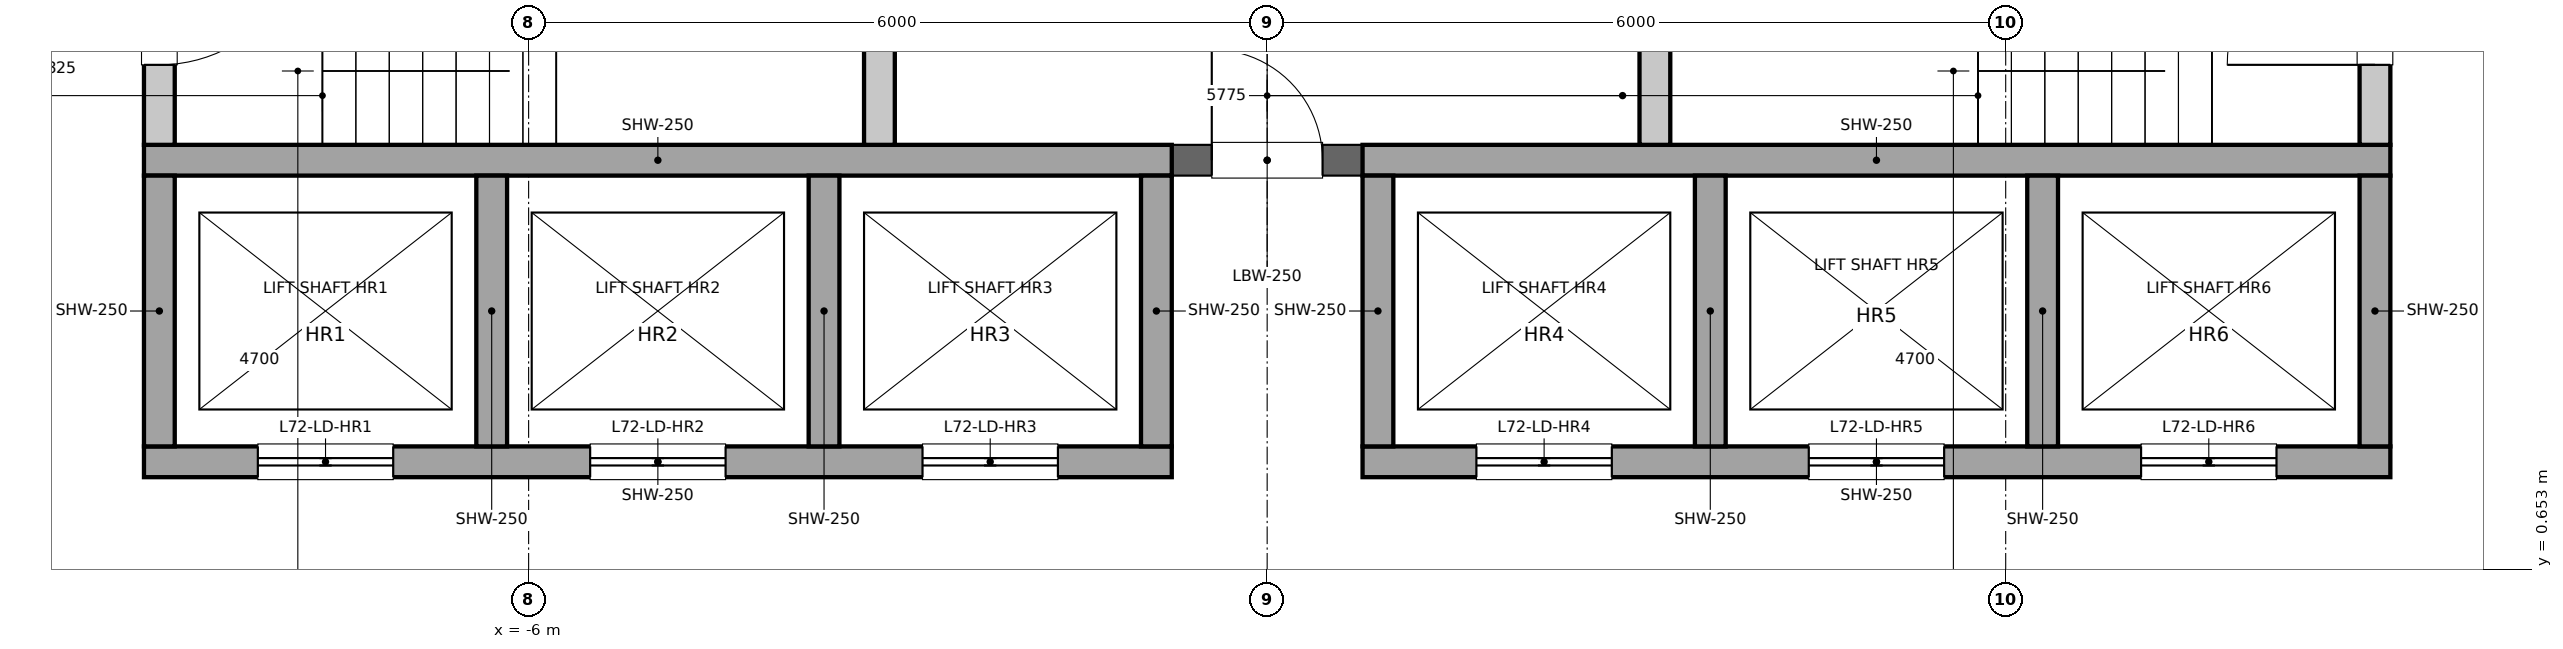
"""IFC4 building model, lengths in metres.
Left out: names, types, materials, properties, quantities, classifications, styles, units other than length and angle.
Written with IfcOpenShell. Run it as: python <this file> out.ifc"""

import sys

from ifc_helpers import new_model, si_unit, direction, frame, frame_2d, origin, place, context, subcontext, project, spatial, rectangle, extrude, element, fill, save


model = new_model("IFC4")
c1 = context("Model", 3, precision=1e-05, world=origin(), true_north=direction((0.0, 1.0)))
c2 = subcontext(c1, "Body", "Model", "MODEL_VIEW")
j1 = project(units=[si_unit("LENGTHUNIT", "METRE"), si_unit("PLANEANGLEUNIT", "RADIAN")], contexts=[c1])
p1 = place(None, origin())
s1 = spatial("IfcSite", under=j1, at=p1, CompositionType="ELEMENT")
p2 = place(p1, origin())
s2 = spatial("IfcBuilding", under=s1, at=p2, CompositionType="ELEMENT")
p3 = place(p2, frame((0.0, 0.0, 324.4)))
s3 = spatial("IfcBuildingStorey", under=s2, at=p3, CompositionType="ELEMENT", Elevation=324.4)
p4 = place(p3, frame((-9.0, 4.1, 0.0), z_axis=(0.0, 0.0, 1.0), x_axis=(0.0, 1.0, 0.0)))
e1 = element("IfcWall", 1, at=p4, inside=s3, PredefinedType="SOLIDWALL", context=c2, shape_type="SweptSolid", body=[
    extrude(rectangle(XDim=2.5, YDim=0.25, at=frame_2d((1.25, 0.0))), origin(), (0.0, 0.0, 1.0), 5.2),
])
p5 = place(p4, frame((0.65, 0.0, 0.0)))
e2 = element("IfcOpeningElement", 2, at=p5, cuts=e1, PredefinedType="OPENING", context=c2, shape_type="SweptSolid", body=[
    extrude(rectangle(XDim=1.2, YDim=2.1, at=frame_2d((0.6, 1.05))), frame((0.0, 0.125, 0.0), z_axis=(0.0, -1.0, 0.0), x_axis=(1.0, 0.0, 0.0)), (0.0, 0.0, 1.0), 0.25),
])
p6 = place(p3, frame((9.0, 4.1, 0.0), z_axis=(0.0, 0.0, 1.0), x_axis=(0.0, 1.0, 0.0)))
e3 = element("IfcWall", 3, at=p6, inside=s3, PredefinedType="SOLIDWALL", context=c2, shape_type="SweptSolid", body=[
    extrude(rectangle(XDim=2.5, YDim=0.25, at=frame_2d((1.25, 0.0))), origin(), (0.0, 0.0, 1.0), 5.2),
])
p7 = place(p6, frame((0.65, 0.0, 0.0)))
e4 = element("IfcOpeningElement", 4, at=p7, cuts=e3, PredefinedType="OPENING", context=c2, shape_type="SweptSolid", body=[
    extrude(rectangle(XDim=1.2, YDim=2.1, at=frame_2d((0.6, 1.05))), frame((0.0, 0.125, 0.0), z_axis=(0.0, -1.0, 0.0), x_axis=(1.0, 0.0, 0.0)), (0.0, 0.0, 1.0), 0.25),
])
for number, where, z_axis, x_axis in (
    (5, (-3.15, 4.1, 0.0), (0.0, 0.0, 1.0), (0.0, 1.0, 0.0)),
    (6, (3.15, 4.1, 0.0), (0.0, 0.0, 1.0), (0.0, 1.0, 0.0)),
):
    element("IfcWall", number, at=place(p3, frame(where, z_axis=z_axis, x_axis=x_axis)), inside=s3, PredefinedType="SOLIDWALL", context=c2, shape_type="SweptSolid", body=[
        extrude(rectangle(XDim=2.5, YDim=0.25, at=frame_2d((1.25, 0.0))), origin(), (0.0, 0.0, 1.0), 5.2),
    ])
p8 = place(p3, frame((-0.775, 3.975, 0.0), z_axis=(0.0, 0.0, 1.0), x_axis=(1.0, 0.0, 0.0)))
e7 = element("IfcWall", 7, at=p8, inside=s3, PredefinedType="PARTITIONING", context=c2, shape_type="SweptSolid", body=[
    extrude(rectangle(XDim=1.55, YDim=0.25, at=frame_2d((0.775, 0.0))), origin(), (0.0, 0.0, 1.0), 5.2),
])
p9 = place(p8, frame((0.325, 0.0, 0.0)))
e8 = element("IfcOpeningElement", 8, at=p9, cuts=e7, PredefinedType="OPENING", context=c2, shape_type="SweptSolid", body=[
    extrude(rectangle(XDim=0.9, YDim=2.1, at=frame_2d((0.45, 1.05))), frame((0.0, 0.125, 0.0), z_axis=(0.0, -1.0, 0.0), x_axis=(1.0, 0.0, 0.0)), (0.0, 0.0, 1.0), 0.25),
])
p10 = place(p3, frame((-9.125, 1.525, 0.0), z_axis=(0.0, 0.0, 1.0), x_axis=(1.0, 0.0, 0.0)))
e9 = element("IfcWall", 9, at=p10, inside=s3, PredefinedType="SOLIDWALL", context=c2, shape_type="SweptSolid", body=[
    extrude(rectangle(XDim=8.35, YDim=0.25, at=frame_2d((4.175, 0.0))), origin(), (0.0, 0.0, 1.0), 5.2),
])
p11 = place(p10, frame((0.925, 0.0, 0.0)))
e10 = element("IfcOpeningElement", 10, at=p11, cuts=e9, PredefinedType="OPENING", context=c2, shape_type="SweptSolid", body=[
    extrude(rectangle(XDim=1.1, YDim=2.1, at=frame_2d((0.55, 1.05))), frame((0.0, 0.125, 0.0), z_axis=(0.0, -1.0, 0.0), x_axis=(1.0, 0.0, 0.0)), (0.0, 0.0, 1.0), 0.25),
])
p12 = place(p10, frame((3.625, 0.0, 0.0)))
e11 = element("IfcOpeningElement", 11, at=p12, cuts=e9, PredefinedType="OPENING", context=c2, shape_type="SweptSolid", body=[
    extrude(rectangle(XDim=1.1, YDim=2.1, at=frame_2d((0.55, 1.05))), frame((0.0, 0.125, 0.0), z_axis=(0.0, -1.0, 0.0), x_axis=(1.0, 0.0, 0.0)), (0.0, 0.0, 1.0), 0.25),
])
p13 = place(p10, frame((6.325, 0.0, 0.0)))
e12 = element("IfcOpeningElement", 12, at=p13, cuts=e9, PredefinedType="OPENING", context=c2, shape_type="SweptSolid", body=[
    extrude(rectangle(XDim=1.1, YDim=2.1, at=frame_2d((0.55, 1.05))), frame((0.0, 0.125, 0.0), z_axis=(0.0, -1.0, 0.0), x_axis=(1.0, 0.0, 0.0)), (0.0, 0.0, 1.0), 0.25),
])
p14 = place(p3, frame((0.775, 1.525, 0.0), z_axis=(0.0, 0.0, 1.0), x_axis=(1.0, 0.0, 0.0)))
e13 = element("IfcWall", 13, at=p14, inside=s3, PredefinedType="SOLIDWALL", context=c2, shape_type="SweptSolid", body=[
    extrude(rectangle(XDim=8.35, YDim=0.25, at=frame_2d((4.175, 0.0))), origin(), (0.0, 0.0, 1.0), 5.2),
])
p15 = place(p14, frame((0.925, 0.0, 0.0)))
e14 = element("IfcOpeningElement", 14, at=p15, cuts=e13, PredefinedType="OPENING", context=c2, shape_type="SweptSolid", body=[
    extrude(rectangle(XDim=1.1, YDim=2.1, at=frame_2d((0.55, 1.05))), frame((0.0, 0.125, 0.0), z_axis=(0.0, -1.0, 0.0), x_axis=(1.0, 0.0, 0.0)), (0.0, 0.0, 1.0), 0.25),
])
p16 = place(p14, frame((3.625, 0.0, 0.0)))
e15 = element("IfcOpeningElement", 15, at=p16, cuts=e13, PredefinedType="OPENING", context=c2, shape_type="SweptSolid", body=[
    extrude(rectangle(XDim=1.1, YDim=2.1, at=frame_2d((0.55, 1.05))), frame((0.0, 0.125, 0.0), z_axis=(0.0, -1.0, 0.0), x_axis=(1.0, 0.0, 0.0)), (0.0, 0.0, 1.0), 0.25),
])
p17 = place(p14, frame((6.325, 0.0, 0.0)))
e16 = element("IfcOpeningElement", 16, at=p17, cuts=e13, PredefinedType="OPENING", context=c2, shape_type="SweptSolid", body=[
    extrude(rectangle(XDim=1.1, YDim=2.1, at=frame_2d((0.55, 1.05))), frame((0.0, 0.125, 0.0), z_axis=(0.0, -1.0, 0.0), x_axis=(1.0, 0.0, 0.0)), (0.0, 0.0, 1.0), 0.25),
])
for number, where, z_axis, x_axis in (
    (17, (-9.125, 3.975, 0.0), (0.0, 0.0, 1.0), (1.0, 0.0, 0.0)),
    (18, (0.775, 3.975, 0.0), (0.0, 0.0, 1.0), (1.0, 0.0, 0.0)),
):
    element("IfcWall", number, at=place(p3, frame(where, z_axis=z_axis, x_axis=x_axis)), inside=s3, PredefinedType="SOLIDWALL", context=c2, shape_type="SweptSolid", body=[
        extrude(rectangle(XDim=8.35, YDim=0.25, at=frame_2d((4.175, 0.0))), origin(), (0.0, 0.0, 1.0), 5.2),
    ])
for number, where, z_axis, x_axis in (
    (19, (-9.0, 1.65, 0.0), (0.0, 0.0, 1.0), (0.0, 1.0, 0.0)),
    (20, (9.0, 1.65, 0.0), (0.0, 0.0, 1.0), (0.0, 1.0, 0.0)),
    (21, (-6.3, 1.65, 0.0), (0.0, 0.0, 1.0), (0.0, 1.0, 0.0)),
    (22, (6.3, 1.65, 0.0), (0.0, 0.0, 1.0), (0.0, 1.0, 0.0)),
    (23, (-3.6, 1.65, 0.0), (0.0, 0.0, 1.0), (0.0, 1.0, 0.0)),
    (24, (3.6, 1.65, 0.0), (0.0, 0.0, 1.0), (0.0, 1.0, 0.0)),
    (25, (-0.9, 1.65, 0.0), (0.0, 0.0, 1.0), (0.0, 1.0, 0.0)),
    (26, (0.9, 1.65, 0.0), (0.0, 0.0, 1.0), (0.0, 1.0, 0.0)),
):
    element("IfcWall", number, at=place(p3, frame(where, z_axis=z_axis, x_axis=x_axis)), inside=s3, PredefinedType="SOLIDWALL", context=c2, shape_type="SweptSolid", body=[
        extrude(rectangle(XDim=2.2, YDim=0.25, at=frame_2d((1.1, 0.0))), origin(), (0.0, 0.0, 1.0), 5.2),
    ])
p18 = place(p11, origin())
e27 = element("IfcDoor", 27, at=p18, inside=s3, OperationType="DOUBLE_DOOR_SLIDING", PredefinedType="DOOR", context=c2, shape_type="SweptSolid", body=[
    extrude(rectangle(XDim=1.1, YDim=2.1, at=frame_2d((0.55, 1.05))), frame((0.0, 0.025, 0.0), z_axis=(0.0, -1.0, 0.0), x_axis=(1.0, 0.0, 0.0)), (0.0, 0.0, 1.0), 0.05),
])
fill(e10, e27)
p19 = place(p12, origin())
e28 = element("IfcDoor", 28, at=p19, inside=s3, OperationType="DOUBLE_DOOR_SLIDING", PredefinedType="DOOR", context=c2, shape_type="SweptSolid", body=[
    extrude(rectangle(XDim=1.1, YDim=2.1, at=frame_2d((0.55, 1.05))), frame((0.0, 0.025, 0.0), z_axis=(0.0, -1.0, 0.0), x_axis=(1.0, 0.0, 0.0)), (0.0, 0.0, 1.0), 0.05),
])
fill(e11, e28)
p20 = place(p13, origin())
e29 = element("IfcDoor", 29, at=p20, inside=s3, OperationType="DOUBLE_DOOR_SLIDING", PredefinedType="DOOR", context=c2, shape_type="SweptSolid", body=[
    extrude(rectangle(XDim=1.1, YDim=2.1, at=frame_2d((0.55, 1.05))), frame((0.0, 0.025, 0.0), z_axis=(0.0, -1.0, 0.0), x_axis=(1.0, 0.0, 0.0)), (0.0, 0.0, 1.0), 0.05),
])
fill(e12, e29)
p21 = place(p15, origin())
e30 = element("IfcDoor", 30, at=p21, inside=s3, OperationType="DOUBLE_DOOR_SLIDING", PredefinedType="DOOR", context=c2, shape_type="SweptSolid", body=[
    extrude(rectangle(XDim=1.1, YDim=2.1, at=frame_2d((0.55, 1.05))), frame((0.0, 0.025, 0.0), z_axis=(0.0, -1.0, 0.0), x_axis=(1.0, 0.0, 0.0)), (0.0, 0.0, 1.0), 0.05),
])
fill(e14, e30)
p22 = place(p16, origin())
e31 = element("IfcDoor", 31, at=p22, inside=s3, OperationType="DOUBLE_DOOR_SLIDING", PredefinedType="DOOR", context=c2, shape_type="SweptSolid", body=[
    extrude(rectangle(XDim=1.1, YDim=2.1, at=frame_2d((0.55, 1.05))), frame((0.0, 0.025, 0.0), z_axis=(0.0, -1.0, 0.0), x_axis=(1.0, 0.0, 0.0)), (0.0, 0.0, 1.0), 0.05),
])
fill(e15, e31)
p23 = place(p17, origin())
e32 = element("IfcDoor", 32, at=p23, inside=s3, OperationType="DOUBLE_DOOR_SLIDING", PredefinedType="DOOR", context=c2, shape_type="SweptSolid", body=[
    extrude(rectangle(XDim=1.1, YDim=2.1, at=frame_2d((0.55, 1.05))), frame((0.0, 0.025, 0.0), z_axis=(0.0, -1.0, 0.0), x_axis=(1.0, 0.0, 0.0)), (0.0, 0.0, 1.0), 0.05),
])
fill(e16, e32)
p24 = place(p5, origin())
e33 = element("IfcDoor", 33, at=p24, inside=s3, OperationType="SINGLE_SWING_RIGHT", PredefinedType="DOOR", context=c2, shape_type="SweptSolid", body=[
    extrude(rectangle(XDim=1.2, YDim=2.1, at=frame_2d((0.6, 1.05))), frame((0.0, 0.025, 0.0), z_axis=(0.0, -1.0, 0.0), x_axis=(1.0, 0.0, 0.0)), (0.0, 0.0, 1.0), 0.05),
])
fill(e2, e33)
p25 = place(p7, origin())
e34 = element("IfcDoor", 34, at=p25, inside=s3, OperationType="SINGLE_SWING_LEFT", PredefinedType="DOOR", context=c2, shape_type="SweptSolid", body=[
    extrude(rectangle(XDim=1.2, YDim=2.1, at=frame_2d((0.6, 1.05))), frame((0.0, 0.025, 0.0), z_axis=(0.0, -1.0, 0.0), x_axis=(1.0, 0.0, 0.0)), (0.0, 0.0, 1.0), 0.05),
])
fill(e4, e34)
p26 = place(p9, origin())
e35 = element("IfcDoor", 35, at=p26, inside=s3, OperationType="SINGLE_SWING_LEFT", PredefinedType="DOOR", context=c2, shape_type="SweptSolid", body=[
    extrude(rectangle(XDim=0.9, YDim=2.1, at=frame_2d((0.45, 1.05))), frame((0.0, 0.025, 0.0), z_axis=(0.0, -1.0, 0.0), x_axis=(1.0, 0.0, 0.0)), (0.0, 0.0, 1.0), 0.05),
])
fill(e8, e35)
save(model, sys.argv[1])
